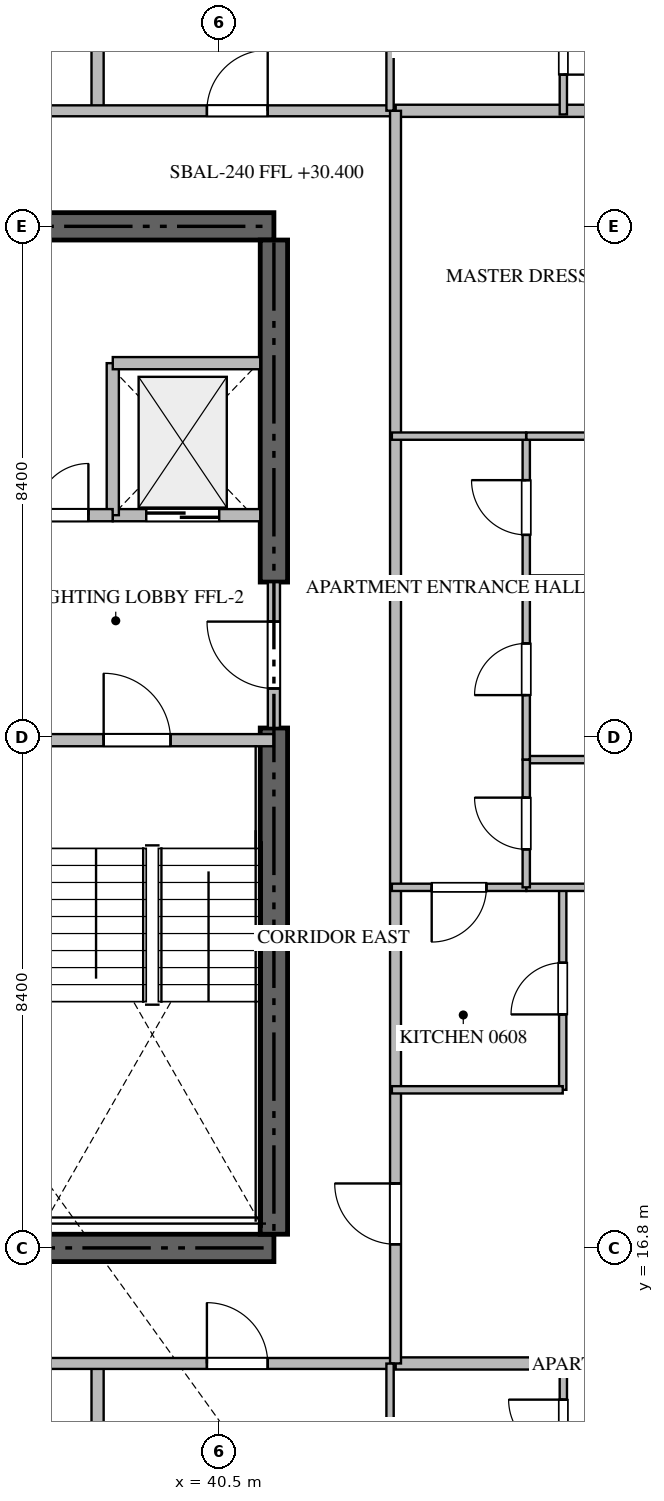
"""IFC4 building model, lengths in metres.
Left out: names, types, materials, properties, quantities, classifications, styles, units other than length and angle.
Written with IfcOpenShell. Run it as: python <this file> out.ifc"""

import sys

from ifc_helpers import new_model, si_unit, direction, frame, frame_2d, origin, place, context, subcontext, project, spatial, rectangle, extrude, source, transform, mapped, element, fill, save


model = new_model("IFC4")
c1 = context("Model", 3, precision=1e-05, world=origin(), true_north=direction((0.0, 1.0)))
c2 = subcontext(c1, "Body", "Model", "MODEL_VIEW")
j1 = project(units=[si_unit("LENGTHUNIT", "METRE"), si_unit("PLANEANGLEUNIT", "RADIAN")], contexts=[c1])
p1 = place(None, origin())
s1 = spatial("IfcSite", under=j1, at=p1, CompositionType="ELEMENT")
p2 = place(p1, origin())
s2 = spatial("IfcBuilding", under=s1, at=p2, CompositionType="ELEMENT")
p3 = place(p2, frame((0.0, 0.0, 30.45)))
s3 = spatial("IfcBuildingStorey", under=s2, at=p3, CompositionType="ELEMENT", Elevation=30.45)
for number, where, z_axis, x_axis in (
    (1, (23.4, 16.8, -0.26), (0.0, 0.0, 1.0), (1.0, 0.0, 0.0)),
    (2, (41.4, 33.6, -0.26), (0.0, 0.0, 1.0), (-1.0, 0.0, 0.0)),
):
    element("IfcWall", number, at=place(p3, frame(where, z_axis=z_axis, x_axis=x_axis)), inside=s3, PredefinedType="SHEAR", context=c2, shape_type="SweptSolid", body=[
        extrude(rectangle(XDim=18.0, YDim=0.45, at=frame_2d((9.0, 0.0))), origin(), (0.0, 0.0, 1.0), 3.748),
    ])
p4 = place(p3, frame((41.4, 17.025, -0.26), z_axis=(0.0, 0.0, 1.0), x_axis=(0.0, 1.0, 0.0)))
e3 = element("IfcWall", 3, at=p4, inside=s3, PredefinedType="SHEAR", context=c2, shape_type="SweptSolid", body=[
    extrude(rectangle(XDim=8.325, YDim=0.45, at=frame_2d((4.163, 0.0))), origin(), (0.0, 0.0, 1.0), 3.748),
])
p5 = place(p3, frame((41.4, 27.75, -0.26), z_axis=(0.0, 0.0, 1.0), x_axis=(0.0, 1.0, 0.0)))
e4 = element("IfcWall", 4, at=p5, inside=s3, PredefinedType="SHEAR", context=c2, shape_type="SweptSolid", body=[
    extrude(rectangle(XDim=5.625, YDim=0.45, at=frame_2d((2.812, 0.0))), origin(), (0.0, 0.0, 1.0), 3.748),
])
p6 = place(p3, frame((36.95, 25.15, 0.0), z_axis=(0.0, 0.0, 1.0), x_axis=(1.0, 0.0, 0.0)))
e5 = element("IfcWall", 5, at=p6, inside=s3, PredefinedType="STANDARD", context=c2, shape_type="SweptSolid", body=[
    extrude(rectangle(XDim=4.45, YDim=0.2, at=frame_2d((2.225, 0.0))), origin(), (0.0, 0.0, 1.0), 3.49),
])
p7 = place(p6, frame((1.65, 0.0, 0.0)))
e6 = element("IfcOpeningElement", 6, at=p7, cuts=e5, PredefinedType="OPENING", context=c2, shape_type="SweptSolid", body=[
    extrude(rectangle(XDim=1.1, YDim=2.15, at=frame_2d((0.55, 1.075))), frame((0.0, 0.11, 0.0), z_axis=(0.0, -1.0, 0.0), x_axis=(1.0, 0.0, 0.0)), (0.0, 0.0, 1.0), 0.22),
])
p8 = place(p3, frame((38.75, 28.85, 0.0), z_axis=(0.0, 0.0, 1.0), x_axis=(1.0, 0.0, 0.0)))
e7 = element("IfcWall", 7, at=p8, inside=s3, PredefinedType="STANDARD", context=c2, shape_type="SweptSolid", body=[
    extrude(rectangle(XDim=2.425, YDim=0.2, at=frame_2d((1.212, 0.0))), origin(), (0.0, 0.0, 1.0), 3.49),
])
p9 = place(p8, frame((0.55, 0.0, 0.0)))
e8 = element("IfcOpeningElement", 8, at=p9, cuts=e7, PredefinedType="OPENING", context=c2, shape_type="SweptSolid", body=[
    extrude(rectangle(XDim=1.2, YDim=2.2, at=frame_2d((0.6, 1.1))), frame((0.0, 0.11, 0.0), z_axis=(0.0, -1.0, 0.0), x_axis=(1.0, 0.0, 0.0)), (0.0, 0.0, 1.0), 0.22),
])
p10 = place(p3, frame((38.75, 28.85, 0.0), z_axis=(0.0, 0.0, 1.0), x_axis=(0.0, 1.0, 0.0)))
e9 = element("IfcWall", 9, at=p10, inside=s3, PredefinedType="STANDARD", context=c2, shape_type="SweptSolid", body=[
    extrude(rectangle(XDim=2.5, YDim=0.2, at=frame_2d((1.25, 0.0))), origin(), (0.0, 0.0, 1.0), 3.49),
])
p11 = place(p3, frame((38.75, 31.35, 0.0), z_axis=(0.0, 0.0, 1.0), x_axis=(1.0, 0.0, 0.0)))
e10 = element("IfcWall", 10, at=p11, inside=s3, PredefinedType="STANDARD", context=c2, shape_type="SweptSolid", body=[
    extrude(rectangle(XDim=2.425, YDim=0.2, at=frame_2d((1.212, 0.0))), origin(), (0.0, 0.0, 1.0), 3.49),
])
p12 = place(p3, frame((37.1, 28.85, 0.0), z_axis=(0.0, 0.0, 1.0), x_axis=(1.0, 0.0, 0.0)))
e11 = element("IfcWall", 11, at=p12, inside=s3, PredefinedType="STANDARD", context=c2, shape_type="SweptSolid", body=[
    extrude(rectangle(XDim=1.648, YDim=0.2, at=frame_2d((0.824, 0.0))), origin(), (0.0, 0.0, 1.0), 3.49),
])
p13 = place(p12, frame((0.399, 0.0, 0.0)))
e12 = element("IfcOpeningElement", 12, at=p13, cuts=e11, PredefinedType="OPENING", context=c2, shape_type="SweptSolid", body=[
    extrude(rectangle(XDim=0.85, YDim=2.1, at=frame_2d((0.425, 1.05))), frame((0.0, 0.11, 0.0), z_axis=(0.0, -1.0, 0.0), x_axis=(1.0, 0.0, 0.0)), (0.0, 0.0, 1.0), 0.22),
])
p14 = place(p3, frame((41.4, 25.352, 0.0), z_axis=(0.0, 0.0, 1.0), x_axis=(0.0, 1.0, 0.0)))
e13 = element("IfcWall", 13, at=p14, inside=s3, PredefinedType="STANDARD", context=c2, shape_type="SweptSolid", body=[
    extrude(rectangle(XDim=2.396, YDim=0.2, at=frame_2d((1.198, 0.0))), origin(), (0.0, 0.0, 1.0), 3.49),
])
p15 = place(p14, frame((0.648, 0.0, 0.0)))
e14 = element("IfcOpeningElement", 14, at=p15, cuts=e13, PredefinedType="OPENING", context=c2, shape_type="SweptSolid", body=[
    extrude(rectangle(XDim=1.1, YDim=2.15, at=frame_2d((0.55, 1.075))), frame((0.0, 0.11, 0.0), z_axis=(0.0, -1.0, 0.0), x_axis=(1.0, 0.0, 0.0)), (0.0, 0.0, 1.0), 0.22),
])
for number, where, z_axis, x_axis in (
    (15, (38.5, 0.282, 0.0), (0.0, 0.0, 1.0), (0.0, 1.0, 0.0)),
    (16, (38.5, 35.5, 0.0), (0.0, 0.0, 1.0), (0.0, 1.0, 0.0)),
):
    element("IfcWall", number, at=place(p3, frame(where, z_axis=z_axis, x_axis=x_axis)), inside=s3, PredefinedType="PARTITIONING", context=c2, shape_type="SweptSolid", body=[
        extrude(rectangle(XDim=14.618, YDim=0.2, at=frame_2d((7.309, 0.0))), origin(), (0.0, 0.0, 1.0), 3.49),
    ])
for number, where, z_axis, x_axis in (
    (17, (43.4, 14.9, 0.0), (0.0, 0.0, 1.0), (1.0, 0.0, 0.0)),
    (18, (43.4, 35.5, 0.0), (0.0, 0.0, 1.0), (1.0, 0.0, 0.0)),
):
    element("IfcWall", number, at=place(p3, frame(where, z_axis=z_axis, x_axis=x_axis)), inside=s3, PredefinedType="PARTITIONING", context=c2, shape_type="SweptSolid", body=[
        extrude(rectangle(XDim=15.318, YDim=0.2, at=frame_2d((7.659, 0.0))), origin(), (0.0, 0.0, 1.0), 3.49),
    ])
p16 = place(p3, frame((21.402, 14.9, 0.0), z_axis=(0.0, 0.0, 1.0), x_axis=(1.0, 0.0, 0.0)))
e19 = element("IfcWall", 19, at=p16, inside=s3, PredefinedType="PARTITIONING", context=c2, shape_type="SweptSolid", body=[
    extrude(rectangle(XDim=21.996, YDim=0.18, at=frame_2d((10.998, 0.0))), origin(), (0.0, 0.0, 1.0), 3.49),
])
p17 = place(p16, frame((2.1, 0.0, 0.0)))
e20 = element("IfcOpeningElement", 20, at=p17, cuts=e19, PredefinedType="OPENING", context=c2, shape_type="SweptSolid", body=[
    extrude(rectangle(XDim=1.0, YDim=2.15, at=frame_2d((0.5, 1.075))), frame((0.0, 0.1, 0.0), z_axis=(0.0, -1.0, 0.0), x_axis=(1.0, 0.0, 0.0)), (0.0, 0.0, 1.0), 0.2),
])
p18 = place(p16, frame((6.719, 0.0, 0.0)))
e21 = element("IfcOpeningElement", 21, at=p18, cuts=e19, PredefinedType="OPENING", context=c2, shape_type="SweptSolid", body=[
    extrude(rectangle(XDim=1.0, YDim=2.15, at=frame_2d((0.5, 1.075))), frame((0.0, 0.1, 0.0), z_axis=(0.0, -1.0, 0.0), x_axis=(1.0, 0.0, 0.0)), (0.0, 0.0, 1.0), 0.2),
])
p19 = place(p16, frame((18.896, 0.0, 0.0)))
e22 = element("IfcOpeningElement", 22, at=p19, cuts=e19, PredefinedType="OPENING", context=c2, shape_type="SweptSolid", body=[
    extrude(rectangle(XDim=1.0, YDim=2.15, at=frame_2d((0.5, 1.075))), frame((0.0, 0.1, 0.0), z_axis=(0.0, -1.0, 0.0), x_axis=(1.0, 0.0, 0.0)), (0.0, 0.0, 1.0), 0.2),
])
p20 = place(p3, frame((21.402, 35.5, 0.0), z_axis=(0.0, 0.0, 1.0), x_axis=(1.0, 0.0, 0.0)))
e23 = element("IfcWall", 23, at=p20, inside=s3, PredefinedType="PARTITIONING", context=c2, shape_type="SweptSolid", body=[
    extrude(rectangle(XDim=21.996, YDim=0.18, at=frame_2d((10.998, 0.0))), origin(), (0.0, 0.0, 1.0), 3.49),
])
p21 = place(p20, frame((2.1, 0.0, 0.0)))
e24 = element("IfcOpeningElement", 24, at=p21, cuts=e23, PredefinedType="OPENING", context=c2, shape_type="SweptSolid", body=[
    extrude(rectangle(XDim=1.0, YDim=2.15, at=frame_2d((0.5, 1.075))), frame((0.0, 0.1, 0.0), z_axis=(0.0, -1.0, 0.0), x_axis=(1.0, 0.0, 0.0)), (0.0, 0.0, 1.0), 0.2),
])
p22 = place(p20, frame((14.277, 0.0, 0.0)))
e25 = element("IfcOpeningElement", 25, at=p22, cuts=e23, PredefinedType="OPENING", context=c2, shape_type="SweptSolid", body=[
    extrude(rectangle(XDim=1.0, YDim=2.15, at=frame_2d((0.5, 1.075))), frame((0.0, 0.1, 0.0), z_axis=(0.0, -1.0, 0.0), x_axis=(1.0, 0.0, 0.0)), (0.0, 0.0, 1.0), 0.2),
])
p23 = place(p20, frame((18.896, 0.0, 0.0)))
e26 = element("IfcOpeningElement", 26, at=p23, cuts=e23, PredefinedType="OPENING", context=c2, shape_type="SweptSolid", body=[
    extrude(rectangle(XDim=1.0, YDim=2.15, at=frame_2d((0.5, 1.075))), frame((0.0, 0.1, 0.0), z_axis=(0.0, -1.0, 0.0), x_axis=(1.0, 0.0, 0.0)), (0.0, 0.0, 1.0), 0.2),
])
p24 = place(p3, frame((43.4, 14.9, 0.0), z_axis=(0.0, 0.0, 1.0), x_axis=(0.0, 1.0, 0.0)))
e27 = element("IfcWall", 27, at=p24, inside=s3, PredefinedType="PARTITIONING", context=c2, shape_type="SweptSolid", body=[
    extrude(rectangle(XDim=20.6, YDim=0.18, at=frame_2d((10.3, 0.0))), origin(), (0.0, 0.0, 1.0), 3.49),
])
p25 = place(p24, frame((1.96, 0.0, 0.0)))
e28 = element("IfcOpeningElement", 28, at=p25, cuts=e27, PredefinedType="OPENING", context=c2, shape_type="SweptSolid", body=[
    extrude(rectangle(XDim=1.0, YDim=2.15, at=frame_2d((0.5, 1.075))), frame((0.0, 0.1, 0.0), z_axis=(0.0, -1.0, 0.0), x_axis=(1.0, 0.0, 0.0)), (0.0, 0.0, 1.0), 0.2),
])
p26 = place(p3, frame((43.31, 12.15, 0.0), z_axis=(0.0, 0.0, 1.0), x_axis=(0.0, 1.0, 0.0)))
e29 = element("IfcWall", 29, at=p26, inside=s3, PredefinedType="PARTITIONING", context=c2, shape_type="SweptSolid", body=[
    extrude(rectangle(XDim=2.748, YDim=0.12, at=frame_2d((1.374, 0.0))), origin(), (0.0, 0.0, 1.0), 3.49),
])
p27 = place(p3, frame((46.16, 12.75, 0.0), z_axis=(0.0, 0.0, 1.0), x_axis=(0.0, 1.0, 0.0)))
e30 = element("IfcWall", 30, at=p27, inside=s3, PredefinedType="PARTITIONING", context=c2, shape_type="SweptSolid", body=[
    extrude(rectangle(XDim=2.21, YDim=0.12, at=frame_2d((1.105, 0.0))), origin(), (0.0, 0.0, 1.0), 3.49),
])
p28 = place(p27, frame((0.655, 0.0, 0.0)))
e31 = element("IfcOpeningElement", 31, at=p28, cuts=e30, PredefinedType="OPENING", context=c2, shape_type="SweptSolid", body=[
    extrude(rectangle(XDim=0.9, YDim=2.1, at=frame_2d((0.45, 1.05))), frame((0.0, 0.07, 0.0), z_axis=(0.0, -1.0, 0.0), x_axis=(1.0, 0.0, 0.0)), (0.0, 0.0, 1.0), 0.14),
])
p29 = place(p3, frame((43.31, 38.25, 0.0), z_axis=(0.0, 0.0, 1.0), x_axis=(0.0, -1.0, 0.0)))
e32 = element("IfcWall", 32, at=p29, inside=s3, PredefinedType="PARTITIONING", context=c2, shape_type="SweptSolid", body=[
    extrude(rectangle(XDim=2.748, YDim=0.12, at=frame_2d((1.374, 0.0))), origin(), (0.0, 0.0, 1.0), 3.49),
])
p30 = place(p3, frame((46.16, 37.65, 0.0), z_axis=(0.0, 0.0, 1.0), x_axis=(0.0, -1.0, 0.0)))
e33 = element("IfcWall", 33, at=p30, inside=s3, PredefinedType="PARTITIONING", context=c2, shape_type="SweptSolid", body=[
    extrude(rectangle(XDim=2.21, YDim=0.12, at=frame_2d((1.105, 0.0))), origin(), (0.0, 0.0, 1.0), 3.49),
])
p31 = place(p30, frame((0.655, 0.0, 0.0)))
e34 = element("IfcOpeningElement", 34, at=p31, cuts=e33, PredefinedType="OPENING", context=c2, shape_type="SweptSolid", body=[
    extrude(rectangle(XDim=0.9, YDim=2.1, at=frame_2d((0.45, 1.05))), frame((0.0, 0.07, 0.0), z_axis=(0.0, -1.0, 0.0), x_axis=(1.0, 0.0, 0.0)), (0.0, 0.0, 1.0), 0.14),
])
p32 = place(p3, frame((46.15, 19.4, 0.0), z_axis=(0.0, 0.0, 1.0), x_axis=(0.0, 1.0, 0.0)))
e35 = element("IfcWall", 35, at=p32, inside=s3, PredefinedType="PARTITIONING", context=c2, shape_type="SweptSolid", body=[
    extrude(rectangle(XDim=3.33, YDim=0.12, at=frame_2d((1.665, 0.0))), origin(), (0.0, 0.0, 1.0), 3.49),
])
p33 = place(p32, frame((1.24, 0.0, 0.0)))
e36 = element("IfcOpeningElement", 36, at=p33, cuts=e35, PredefinedType="OPENING", context=c2, shape_type="SweptSolid", body=[
    extrude(rectangle(XDim=0.85, YDim=2.1, at=frame_2d((0.425, 1.05))), frame((0.0, 0.07, 0.0), z_axis=(0.0, -1.0, 0.0), x_axis=(1.0, 0.0, 0.0)), (0.0, 0.0, 1.0), 0.14),
])
p34 = place(p3, frame((46.15, 19.4, 0.0), z_axis=(0.0, 0.0, 1.0), x_axis=(-1.0, 0.0, 0.0)))
e37 = element("IfcWall", 37, at=p34, inside=s3, PredefinedType="PARTITIONING", context=c2, shape_type="SweptSolid", body=[
    extrude(rectangle(XDim=2.81, YDim=0.12, at=frame_2d((1.405, 0.0))), origin(), (0.0, 0.0, 1.0), 3.49),
])
p35 = place(p3, frame((45.55, 22.73, 0.0), z_axis=(0.0, 0.0, 1.0), x_axis=(-1.0, 0.0, 0.0)))
e38 = element("IfcWall", 38, at=p35, inside=s3, PredefinedType="PARTITIONING", context=c2, shape_type="SweptSolid", body=[
    extrude(rectangle(XDim=2.21, YDim=0.12, at=frame_2d((1.105, 0.0))), origin(), (0.0, 0.0, 1.0), 3.49),
])
p36 = place(p35, frame((0.655, 0.0, 0.0)))
e39 = element("IfcOpeningElement", 39, at=p36, cuts=e38, PredefinedType="OPENING", context=c2, shape_type="SweptSolid", body=[
    extrude(rectangle(XDim=0.9, YDim=2.1, at=frame_2d((0.45, 1.05))), frame((0.0, 0.07, 0.0), z_axis=(0.0, -1.0, 0.0), x_axis=(1.0, 0.0, 0.0)), (0.0, 0.0, 1.0), 0.14),
])
p37 = place(p3, frame((54.538, 22.73, 0.0), z_axis=(0.0, 0.0, 1.0), x_axis=(-1.0, 0.0, 0.0)))
e40 = element("IfcWall", 40, at=p37, inside=s3, PredefinedType="PARTITIONING", context=c2, shape_type="SweptSolid", body=[
    extrude(rectangle(XDim=8.986, YDim=0.12, at=frame_2d((4.493, 0.0))), origin(), (0.0, 0.0, 1.0), 3.49),
])
p38 = place(p3, frame((58.705, 27.8, 0.0), z_axis=(0.0, 0.0, 1.0), x_axis=(-1.0, 0.0, 0.0)))
e41 = element("IfcWall", 41, at=p38, inside=s3, PredefinedType="PARTITIONING", context=c2, shape_type="SweptSolid", body=[
    extrude(rectangle(XDim=13.155, YDim=0.12, at=frame_2d((6.578, 0.0))), origin(), (0.0, 0.0, 1.0), 3.49),
])
p39 = place(p3, frame((54.54, 24.83, 0.0), z_axis=(0.0, 0.0, 1.0), x_axis=(-1.0, 0.0, 0.0)))
e42 = element("IfcWall", 42, at=p39, inside=s3, PredefinedType="PARTITIONING", context=c2, shape_type="SweptSolid", body=[
    extrude(rectangle(XDim=8.99, YDim=0.12, at=frame_2d((4.495, 0.0))), origin(), (0.0, 0.0, 1.0), 3.49),
])
p40 = place(p3, frame((45.55, 22.73, 0.0), z_axis=(0.0, 0.0, 1.0), x_axis=(0.0, 1.0, 0.0)))
e43 = element("IfcWall", 43, at=p40, inside=s3, PredefinedType="PARTITIONING", context=c2, shape_type="SweptSolid", body=[
    extrude(rectangle(XDim=2.1, YDim=0.12, at=frame_2d((1.05, 0.0))), origin(), (0.0, 0.0, 1.0), 3.49),
])
p41 = place(p40, frame((0.625, 0.0, 0.0)))
e44 = element("IfcOpeningElement", 44, at=p41, cuts=e43, PredefinedType="OPENING", context=c2, shape_type="SweptSolid", body=[
    extrude(rectangle(XDim=0.85, YDim=2.1, at=frame_2d((0.425, 1.05))), frame((0.0, 0.07, 0.0), z_axis=(0.0, -1.0, 0.0), x_axis=(1.0, 0.0, 0.0)), (0.0, 0.0, 1.0), 0.14),
])
p42 = place(p3, frame((45.55, 24.832, 0.0), z_axis=(0.0, 0.0, 1.0), x_axis=(0.0, 1.0, 0.0)))
e45 = element("IfcWall", 45, at=p42, inside=s3, PredefinedType="PARTITIONING", context=c2, shape_type="SweptSolid", body=[
    extrude(rectangle(XDim=2.968, YDim=0.12, at=frame_2d((1.484, 0.0))), origin(), (0.0, 0.0, 1.0), 3.49),
])
p43 = place(p42, frame((1.059, 0.0, 0.0)))
e46 = element("IfcOpeningElement", 46, at=p43, cuts=e45, PredefinedType="OPENING", context=c2, shape_type="SweptSolid", body=[
    extrude(rectangle(XDim=0.85, YDim=2.1, at=frame_2d((0.425, 1.05))), frame((0.0, 0.07, 0.0), z_axis=(0.0, -1.0, 0.0), x_axis=(1.0, 0.0, 0.0)), (0.0, 0.0, 1.0), 0.14),
])
p44 = place(p3, frame((45.55, 27.802, 0.0), z_axis=(0.0, 0.0, 1.0), x_axis=(0.0, 1.0, 0.0)))
e47 = element("IfcWall", 47, at=p44, inside=s3, PredefinedType="PARTITIONING", context=c2, shape_type="SweptSolid", body=[
    extrude(rectangle(XDim=2.348, YDim=0.12, at=frame_2d((1.174, 0.0))), origin(), (0.0, 0.0, 1.0), 3.49),
])
p45 = place(p44, frame((0.724, 0.0, 0.0)))
e48 = element("IfcOpeningElement", 48, at=p45, cuts=e47, PredefinedType="OPENING", context=c2, shape_type="SweptSolid", body=[
    extrude(rectangle(XDim=0.9, YDim=2.1, at=frame_2d((0.45, 1.05))), frame((0.0, 0.07, 0.0), z_axis=(0.0, -1.0, 0.0), x_axis=(1.0, 0.0, 0.0)), (0.0, 0.0, 1.0), 0.14),
])
p46 = place(p3, frame((52.131, 30.15, 0.0), z_axis=(0.0, 0.0, 1.0), x_axis=(-1.0, 0.0, 0.0)))
e49 = element("IfcWall", 49, at=p46, inside=s3, PredefinedType="PARTITIONING", context=c2, shape_type="SweptSolid", body=[
    extrude(rectangle(XDim=6.581, YDim=0.12, at=frame_2d((3.291, 0.0))), origin(), (0.0, 0.0, 1.0), 3.49),
])
p47 = place(p46, frame((2.866, 0.0, 0.0)))
e50 = element("IfcOpeningElement", 50, at=p47, cuts=e49, PredefinedType="OPENING", context=c2, shape_type="SweptSolid", body=[
    extrude(rectangle(XDim=0.85, YDim=2.1, at=frame_2d((0.425, 1.05))), frame((0.0, 0.07, 0.0), z_axis=(0.0, -1.0, 0.0), x_axis=(1.0, 0.0, 0.0)), (0.0, 0.0, 1.0), 0.14),
])
p48 = place(p3, frame((45.548, 30.15, 0.0), z_axis=(0.0, 0.0, 1.0), x_axis=(-1.0, 0.0, 0.0)))
e51 = element("IfcWall", 51, at=p48, inside=s3, PredefinedType="PARTITIONING", context=c2, shape_type="SweptSolid", body=[
    extrude(rectangle(XDim=2.208, YDim=0.12, at=frame_2d((1.104, 0.0))), origin(), (0.0, 0.0, 1.0), 3.49),
])
m1 = source(origin(), c2, "Body", "SweptSolid", [
    extrude(rectangle(XDim=1.1, YDim=2.15, at=frame_2d((0.55, 1.075))), frame((0.0, 0.025, 0.0), z_axis=(0.0, -1.0, 0.0), x_axis=(1.0, 0.0, 0.0)), (0.0, 0.0, 1.0), 0.05),
])
p49 = place(p7, origin())
e52 = element("IfcDoor", 52, at=p49, inside=s3, OperationType="SINGLE_SWING_LEFT", PredefinedType="DOOR", context=c2, shape_type="MappedRepresentation", body=[
    mapped(m1, transform((0.0, 0.0, 0.0), scale=1.0)),
])
fill(e6, e52)
m2 = source(origin(), c2, "Body", "SweptSolid", [
    extrude(rectangle(XDim=1.2, YDim=2.2, at=frame_2d((0.6, 1.1))), frame((0.0, 0.025, 0.0), z_axis=(0.0, -1.0, 0.0), x_axis=(1.0, 0.0, 0.0)), (0.0, 0.0, 1.0), 0.05),
])
p50 = place(p9, origin())
e53 = element("IfcDoor", 53, at=p50, inside=s3, OperationType="DOUBLE_DOOR_SLIDING", PredefinedType="DOOR", context=c2, shape_type="MappedRepresentation", body=[
    mapped(m2, transform((0.0, 0.0, 0.0), scale=1.0)),
])
fill(e8, e53)
m3 = source(origin(), c2, "Body", "SweptSolid", [
    extrude(rectangle(XDim=0.85, YDim=2.1, at=frame_2d((0.425, 1.05))), frame((0.0, 0.025, 0.0), z_axis=(0.0, -1.0, 0.0), x_axis=(1.0, 0.0, 0.0)), (0.0, 0.0, 1.0), 0.05),
])
p51 = place(p13, origin())
e54 = element("IfcDoor", 54, at=p51, inside=s3, OperationType="SINGLE_SWING_RIGHT", PredefinedType="DOOR", context=c2, shape_type="MappedRepresentation", body=[
    mapped(m3, transform((0.0, 0.0, 0.0), scale=1.0)),
])
fill(e12, e54)
p52 = place(p15, origin())
e55 = element("IfcDoor", 55, at=p52, inside=s3, OperationType="SINGLE_SWING_RIGHT", PredefinedType="DOOR", context=c2, shape_type="MappedRepresentation", body=[
    mapped(m1, transform((0.0, 0.0, 0.0), scale=1.0)),
])
fill(e14, e55)
m4 = source(origin(), c2, "Body", "SweptSolid", [
    extrude(rectangle(XDim=1.0, YDim=2.15, at=frame_2d((0.5, 1.075))), frame((0.0, 0.025, 0.0), z_axis=(0.0, -1.0, 0.0), x_axis=(1.0, 0.0, 0.0)), (0.0, 0.0, 1.0), 0.05),
])
p53 = place(p19, origin())
e56 = element("IfcDoor", 56, at=p53, inside=s3, OperationType="SINGLE_SWING_LEFT", PredefinedType="DOOR", context=c2, shape_type="MappedRepresentation", body=[
    mapped(m4, transform((0.0, 0.0, 0.0), scale=1.0)),
])
fill(e22, e56)
p54 = place(p23, origin())
e57 = element("IfcDoor", 57, at=p54, inside=s3, OperationType="SINGLE_SWING_RIGHT", PredefinedType="DOOR", context=c2, shape_type="MappedRepresentation", body=[
    mapped(m4, transform((0.0, 0.0, 0.0), scale=1.0)),
])
fill(e26, e57)
p55 = place(p25, origin())
e58 = element("IfcDoor", 58, at=p55, inside=s3, OperationType="SINGLE_SWING_RIGHT", PredefinedType="DOOR", context=c2, shape_type="MappedRepresentation", body=[
    mapped(m4, transform((0.0, 0.0, 0.0), scale=1.0)),
])
fill(e28, e58)
m5 = source(origin(), c2, "Body", "SweptSolid", [
    extrude(rectangle(XDim=0.9, YDim=2.1, at=frame_2d((0.45, 1.05))), frame((0.0, 0.025, 0.0), z_axis=(0.0, -1.0, 0.0), x_axis=(1.0, 0.0, 0.0)), (0.0, 0.0, 1.0), 0.05),
])
p56 = place(p28, origin())
e59 = element("IfcDoor", 59, at=p56, inside=s3, OperationType="SINGLE_SWING_RIGHT", PredefinedType="DOOR", context=c2, shape_type="MappedRepresentation", body=[
    mapped(m5, transform((0.0, 0.0, 0.0), scale=1.0)),
])
fill(e31, e59)
p57 = place(p31, origin())
e60 = element("IfcDoor", 60, at=p57, inside=s3, OperationType="SINGLE_SWING_RIGHT", PredefinedType="DOOR", context=c2, shape_type="MappedRepresentation", body=[
    mapped(m5, transform((0.0, 0.0, 0.0), scale=1.0)),
])
fill(e34, e60)
p58 = place(p33, origin())
e61 = element("IfcDoor", 61, at=p58, inside=s3, OperationType="SINGLE_SWING_LEFT", PredefinedType="DOOR", context=c2, shape_type="MappedRepresentation", body=[
    mapped(m3, transform((0.0, 0.0, 0.0), scale=1.0)),
])
fill(e36, e61)
p59 = place(p36, origin())
e62 = element("IfcDoor", 62, at=p59, inside=s3, OperationType="SINGLE_SWING_RIGHT", PredefinedType="DOOR", context=c2, shape_type="MappedRepresentation", body=[
    mapped(m5, transform((0.0, 0.0, 0.0), scale=1.0)),
])
fill(e39, e62)
p60 = place(p41, origin())
e63 = element("IfcDoor", 63, at=p60, inside=s3, OperationType="SINGLE_SWING_RIGHT", PredefinedType="DOOR", context=c2, shape_type="MappedRepresentation", body=[
    mapped(m3, transform((0.0, 0.0, 0.0), scale=1.0)),
])
fill(e44, e63)
p61 = place(p43, origin())
e64 = element("IfcDoor", 64, at=p61, inside=s3, OperationType="SINGLE_SWING_LEFT", PredefinedType="DOOR", context=c2, shape_type="MappedRepresentation", body=[
    mapped(m3, transform((0.0, 0.0, 0.0), scale=1.0)),
])
fill(e46, e64)
p62 = place(p45, origin())
e65 = element("IfcDoor", 65, at=p62, inside=s3, OperationType="SINGLE_SWING_RIGHT", PredefinedType="DOOR", context=c2, shape_type="MappedRepresentation", body=[
    mapped(m5, transform((0.0, 0.0, 0.0), scale=1.0)),
])
fill(e48, e65)
save(model, sys.argv[1])
